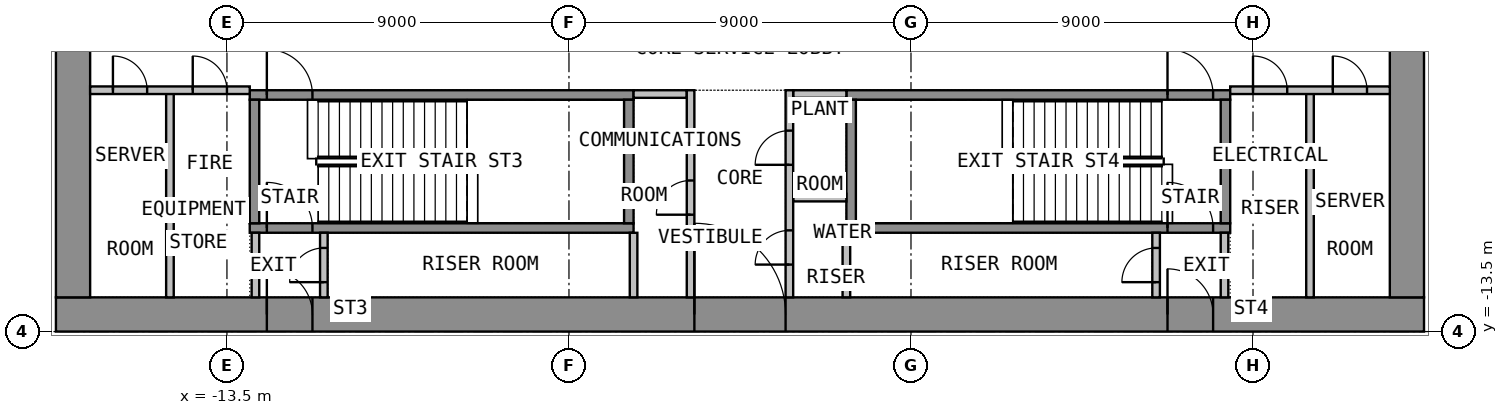
"""IFC4 building model, lengths in metres.
Left out: names, types, materials, properties, quantities, classifications, styles, units other than length and angle.
Written with IfcOpenShell. Run it as: python <this file> out.ifc"""

import sys

from ifc_helpers import new_model, si_unit, direction, frame, frame_2d, origin, place, context, subcontext, project, spatial, rectangle, extrude, element, fill, save


model = new_model("IFC4")
c1 = context("Model", 3, precision=1e-05, world=origin(), true_north=direction((0.0, 1.0)))
c2 = subcontext(c1, "Body", "Model", "MODEL_VIEW")
j1 = project(units=[si_unit("LENGTHUNIT", "METRE"), si_unit("PLANEANGLEUNIT", "RADIAN")], contexts=[c1])
p1 = place(None, origin())
s1 = spatial("IfcSite", under=j1, at=p1, CompositionType="ELEMENT")
p2 = place(p1, origin())
s2 = spatial("IfcBuilding", under=s1, at=p2, CompositionType="ELEMENT")
p3 = place(p2, frame((0.0, 0.0, -5.0)))
s3 = spatial("IfcBuildingStorey", under=s2, at=p3, CompositionType="ELEMENT", Elevation=-5.0)
p4 = place(p3, frame((-18.0, -13.05, 0.0), z_axis=(0.0, 0.0, 1.0), x_axis=(1.0, 0.0, 0.0)))
e1 = element("IfcWall", 1, at=p4, inside=s3, PredefinedType="SHEAR", context=c2, shape_type="SweptSolid", body=[
    extrude(rectangle(XDim=36.0, YDim=0.9, at=frame_2d((18.0, 0.0))), origin(), (0.0, 0.0, 1.0), 4.55),
])
p5 = place(p4, frame((16.8, 0.0, 0.0)))
e2 = element("IfcOpeningElement", 2, at=p5, cuts=e1, PredefinedType="OPENING", context=c2, shape_type="SweptSolid", body=[
    extrude(rectangle(XDim=2.4, YDim=2.1, at=frame_2d((1.2, 1.05))), frame((0.0, 0.46, 0.0), z_axis=(0.0, -1.0, 0.0), x_axis=(1.0, 0.0, 0.0)), (0.0, 0.0, 1.0), 0.92),
])
p6 = place(p4, frame((5.55, 0.0, 0.0)))
e3 = element("IfcOpeningElement", 3, at=p6, cuts=e1, PredefinedType="OPENING", context=c2, shape_type="SweptSolid", body=[
    extrude(rectangle(XDim=1.2, YDim=2.1, at=frame_2d((0.6, 1.05))), frame((0.0, 0.46, 0.0), z_axis=(0.0, -1.0, 0.0), x_axis=(1.0, 0.0, 0.0)), (0.0, 0.0, 1.0), 0.92),
])
p7 = place(p4, frame((29.25, 0.0, 0.0)))
e4 = element("IfcOpeningElement", 4, at=p7, cuts=e1, PredefinedType="OPENING", context=c2, shape_type="SweptSolid", body=[
    extrude(rectangle(XDim=1.2, YDim=2.1, at=frame_2d((0.6, 1.05))), frame((0.0, 0.46, 0.0), z_axis=(0.0, -1.0, 0.0), x_axis=(1.0, 0.0, 0.0)), (0.0, 0.0, 1.0), 0.92),
])
p8 = place(p3, frame((-17.55, -12.6, 0.0), z_axis=(0.0, 0.0, 1.0), x_axis=(0.0, 1.0, 0.0)))
e5 = element("IfcWall", 5, at=p8, inside=s3, PredefinedType="SHEAR", context=c2, shape_type="SweptSolid", body=[
    extrude(rectangle(XDim=25.2, YDim=0.9, at=frame_2d((12.6, 0.0))), origin(), (0.0, 0.0, 1.0), 4.55),
])
p9 = place(p8, frame((11.4, 0.0, 0.0)))
e6 = element("IfcOpeningElement", 6, at=p9, cuts=e5, PredefinedType="OPENING", context=c2, shape_type="SweptSolid", body=[
    extrude(rectangle(XDim=2.4, YDim=2.1, at=frame_2d((1.2, 1.05))), frame((0.0, 0.46, 0.0), z_axis=(0.0, -1.0, 0.0), x_axis=(1.0, 0.0, 0.0)), (0.0, 0.0, 1.0), 0.92),
])
p10 = place(p3, frame((17.55, -12.6, 0.0), z_axis=(0.0, 0.0, 1.0), x_axis=(0.0, 1.0, 0.0)))
e7 = element("IfcWall", 7, at=p10, inside=s3, PredefinedType="SHEAR", context=c2, shape_type="SweptSolid", body=[
    extrude(rectangle(XDim=25.2, YDim=0.9, at=frame_2d((12.6, 0.0))), origin(), (0.0, 0.0, 1.0), 4.55),
])
p11 = place(p10, frame((11.4, 0.0, 0.0)))
e8 = element("IfcOpeningElement", 8, at=p11, cuts=e7, PredefinedType="OPENING", context=c2, shape_type="SweptSolid", body=[
    extrude(rectangle(XDim=2.4, YDim=2.1, at=frame_2d((1.2, 1.05))), frame((0.0, 0.46, 0.0), z_axis=(0.0, -1.0, 0.0), x_axis=(1.0, 0.0, 0.0)), (0.0, 0.0, 1.0), 0.92),
])
p12 = place(p3, frame((-12.9, -10.775, 0.0), z_axis=(0.0, 0.0, 1.0), x_axis=(1.0, 0.0, 0.0)))
e9 = element("IfcWall", 9, at=p12, inside=s3, PredefinedType="SHEAR", context=c2, shape_type="SweptSolid", body=[
    extrude(rectangle(XDim=10.1, YDim=0.25, at=frame_2d((5.05, 0.0))), origin(), (0.0, 0.0, 1.0), 4.55),
])
p13 = place(p12, frame((0.45, 0.0, 0.0)))
e10 = element("IfcOpeningElement", 10, at=p13, cuts=e9, PredefinedType="OPENING", context=c2, shape_type="SweptSolid", body=[
    extrude(rectangle(XDim=1.2, YDim=2.1, at=frame_2d((0.6, 1.05))), frame((0.0, 0.135, 0.0), z_axis=(0.0, -1.0, 0.0), x_axis=(1.0, 0.0, 0.0)), (0.0, 0.0, 1.0), 0.27),
])
p14 = place(p3, frame((-12.9, -7.275, 0.0), z_axis=(0.0, 0.0, 1.0), x_axis=(1.0, 0.0, 0.0)))
e11 = element("IfcWall", 11, at=p14, inside=s3, PredefinedType="SHEAR", context=c2, shape_type="SweptSolid", body=[
    extrude(rectangle(XDim=10.1, YDim=0.25, at=frame_2d((5.05, 0.0))), origin(), (0.0, 0.0, 1.0), 4.55),
])
p15 = place(p14, frame((0.45, 0.0, 0.0)))
e12 = element("IfcOpeningElement", 12, at=p15, cuts=e11, PredefinedType="OPENING", context=c2, shape_type="SweptSolid", body=[
    extrude(rectangle(XDim=1.2, YDim=2.1, at=frame_2d((0.6, 1.05))), frame((0.0, 0.135, 0.0), z_axis=(0.0, -1.0, 0.0), x_axis=(1.0, 0.0, 0.0)), (0.0, 0.0, 1.0), 0.27),
])
for number, where, z_axis, x_axis in (
    (13, (-12.775, -10.65, 0.0), (0.0, 0.0, 1.0), (0.0, 1.0, 0.0)),
    (14, (-2.925, -10.65, 0.0), (0.0, 0.0, 1.0), (0.0, 1.0, 0.0)),
):
    element("IfcWall", number, at=place(p3, frame(where, z_axis=z_axis, x_axis=x_axis)), inside=s3, PredefinedType="SHEAR", context=c2, shape_type="SweptSolid", body=[
        extrude(rectangle(XDim=3.25, YDim=0.25, at=frame_2d((1.625, 0.0))), origin(), (0.0, 0.0, 1.0), 4.55),
    ])
p16 = place(p3, frame((2.8, -10.775, 0.0), z_axis=(0.0, 0.0, 1.0), x_axis=(1.0, 0.0, 0.0)))
e15 = element("IfcWall", 15, at=p16, inside=s3, PredefinedType="SHEAR", context=c2, shape_type="SweptSolid", body=[
    extrude(rectangle(XDim=10.1, YDim=0.25, at=frame_2d((5.05, 0.0))), origin(), (0.0, 0.0, 1.0), 4.55),
])
p17 = place(p16, frame((8.45, 0.0, 0.0)))
e16 = element("IfcOpeningElement", 16, at=p17, cuts=e15, PredefinedType="OPENING", context=c2, shape_type="SweptSolid", body=[
    extrude(rectangle(XDim=1.2, YDim=2.1, at=frame_2d((0.6, 1.05))), frame((0.0, 0.135, 0.0), z_axis=(0.0, -1.0, 0.0), x_axis=(1.0, 0.0, 0.0)), (0.0, 0.0, 1.0), 0.27),
])
p18 = place(p3, frame((2.8, -7.275, 0.0), z_axis=(0.0, 0.0, 1.0), x_axis=(1.0, 0.0, 0.0)))
e17 = element("IfcWall", 17, at=p18, inside=s3, PredefinedType="SHEAR", context=c2, shape_type="SweptSolid", body=[
    extrude(rectangle(XDim=10.1, YDim=0.25, at=frame_2d((5.05, 0.0))), origin(), (0.0, 0.0, 1.0), 4.55),
])
p19 = place(p18, frame((8.45, 0.0, 0.0)))
e18 = element("IfcOpeningElement", 18, at=p19, cuts=e17, PredefinedType="OPENING", context=c2, shape_type="SweptSolid", body=[
    extrude(rectangle(XDim=1.2, YDim=2.1, at=frame_2d((0.6, 1.05))), frame((0.0, 0.135, 0.0), z_axis=(0.0, -1.0, 0.0), x_axis=(1.0, 0.0, 0.0)), (0.0, 0.0, 1.0), 0.27),
])
for number, where, z_axis, x_axis in (
    (19, (2.925, -10.65, 0.0), (0.0, 0.0, 1.0), (0.0, 1.0, 0.0)),
    (20, (12.775, -10.65, 0.0), (0.0, 0.0, 1.0), (0.0, 1.0, 0.0)),
):
    element("IfcWall", number, at=place(p3, frame(where, z_axis=z_axis, x_axis=x_axis)), inside=s3, PredefinedType="SHEAR", context=c2, shape_type="SweptSolid", body=[
        extrude(rectangle(XDim=3.25, YDim=0.25, at=frame_2d((1.625, 0.0))), origin(), (0.0, 0.0, 1.0), 4.55),
    ])
for number, where, z_axis, x_axis in (
    (21, (-2.8, -7.25, 0.0), (0.0, 0.0, 1.0), (1.0, 0.0, 0.0)),
    (22, (1.4, -7.25, 0.0), (0.0, 0.0, 1.0), (1.0, 0.0, 0.0)),
    (23, (1.4, -9.975, 0.0), (0.0, 0.0, 1.0), (1.0, 0.0, 0.0)),
):
    element("IfcWall", number, at=place(p3, frame(where, z_axis=z_axis, x_axis=x_axis)), inside=s3, PredefinedType="PARTITIONING", context=c2, shape_type="SweptSolid", body=[
        extrude(rectangle(XDim=1.4, YDim=0.2, at=frame_2d((0.7, 0.0))), origin(), (0.0, 0.0, 1.0), 4.55),
    ])
p20 = place(p3, frame((-1.3, -12.6, 0.0), z_axis=(0.0, 0.0, 1.0), x_axis=(0.0, 1.0, 0.0)))
e24 = element("IfcWall", 24, at=p20, inside=s3, PredefinedType="PARTITIONING", context=c2, shape_type="SweptSolid", body=[
    extrude(rectangle(XDim=5.45, YDim=0.2, at=frame_2d((2.725, 0.0))), origin(), (0.0, 0.0, 1.0), 4.55),
])
p21 = place(p20, frame((2.175, 0.0, 0.0)))
e25 = element("IfcOpeningElement", 25, at=p21, cuts=e24, PredefinedType="OPENING", context=c2, shape_type="SweptSolid", body=[
    extrude(rectangle(XDim=0.9, YDim=2.1, at=frame_2d((0.45, 1.05))), frame((0.0, 0.11, 0.0), z_axis=(0.0, -1.0, 0.0), x_axis=(1.0, 0.0, 0.0)), (0.0, 0.0, 1.0), 0.22),
])
p22 = place(p3, frame((1.3, -12.6, 0.0), z_axis=(0.0, 0.0, 1.0), x_axis=(0.0, 1.0, 0.0)))
e26 = element("IfcWall", 26, at=p22, inside=s3, PredefinedType="PARTITIONING", context=c2, shape_type="SweptSolid", body=[
    extrude(rectangle(XDim=5.45, YDim=0.2, at=frame_2d((2.725, 0.0))), origin(), (0.0, 0.0, 1.0), 4.55),
])
p23 = place(p22, frame((0.863, 0.0, 0.0)))
e27 = element("IfcOpeningElement", 27, at=p23, cuts=e26, PredefinedType="OPENING", context=c2, shape_type="SweptSolid", body=[
    extrude(rectangle(XDim=0.9, YDim=2.1, at=frame_2d((0.45, 1.05))), frame((0.0, 0.11, 0.0), z_axis=(0.0, -1.0, 0.0), x_axis=(1.0, 0.0, 0.0)), (0.0, 0.0, 1.0), 0.22),
])
p24 = place(p22, frame((3.488, 0.0, 0.0)))
e28 = element("IfcOpeningElement", 28, at=p24, cuts=e26, PredefinedType="OPENING", context=c2, shape_type="SweptSolid", body=[
    extrude(rectangle(XDim=0.9, YDim=2.1, at=frame_2d((0.45, 1.05))), frame((0.0, 0.11, 0.0), z_axis=(0.0, -1.0, 0.0), x_axis=(1.0, 0.0, 0.0)), (0.0, 0.0, 1.0), 0.22),
])
p25 = place(p3, frame((-12.75, -12.6, 0.0), z_axis=(0.0, 0.0, 1.0), x_axis=(0.0, 1.0, 0.0)))
e29 = element("IfcWall", 29, at=p25, inside=s3, PredefinedType="PARTITIONING", context=c2, shape_type="SweptSolid", body=[
    extrude(rectangle(XDim=1.7, YDim=0.2, at=frame_2d((0.85, 0.0))), origin(), (0.0, 0.0, 1.0), 4.55),
])
p26 = place(p3, frame((-10.95, -12.6, 0.0), z_axis=(0.0, 0.0, 1.0), x_axis=(0.0, 1.0, 0.0)))
e30 = element("IfcWall", 30, at=p26, inside=s3, PredefinedType="PARTITIONING", context=c2, shape_type="SweptSolid", body=[
    extrude(rectangle(XDim=1.7, YDim=0.2, at=frame_2d((0.85, 0.0))), origin(), (0.0, 0.0, 1.0), 4.55),
])
p27 = place(p26, frame((0.4, 0.0, 0.0)))
e31 = element("IfcOpeningElement", 31, at=p27, cuts=e30, PredefinedType="OPENING", context=c2, shape_type="SweptSolid", body=[
    extrude(rectangle(XDim=0.9, YDim=2.1, at=frame_2d((0.45, 1.05))), frame((0.0, 0.11, 0.0), z_axis=(0.0, -1.0, 0.0), x_axis=(1.0, 0.0, 0.0)), (0.0, 0.0, 1.0), 0.22),
])
p28 = place(p3, frame((12.75, -12.6, 0.0), z_axis=(0.0, 0.0, 1.0), x_axis=(0.0, 1.0, 0.0)))
e32 = element("IfcWall", 32, at=p28, inside=s3, PredefinedType="PARTITIONING", context=c2, shape_type="SweptSolid", body=[
    extrude(rectangle(XDim=1.7, YDim=0.2, at=frame_2d((0.85, 0.0))), origin(), (0.0, 0.0, 1.0), 4.55),
])
p29 = place(p3, frame((10.95, -12.6, 0.0), z_axis=(0.0, 0.0, 1.0), x_axis=(0.0, 1.0, 0.0)))
e33 = element("IfcWall", 33, at=p29, inside=s3, PredefinedType="PARTITIONING", context=c2, shape_type="SweptSolid", body=[
    extrude(rectangle(XDim=1.7, YDim=0.2, at=frame_2d((0.85, 0.0))), origin(), (0.0, 0.0, 1.0), 4.55),
])
p30 = place(p29, frame((0.4, 0.0, 0.0)))
e34 = element("IfcOpeningElement", 34, at=p30, cuts=e33, PredefinedType="OPENING", context=c2, shape_type="SweptSolid", body=[
    extrude(rectangle(XDim=0.9, YDim=2.1, at=frame_2d((0.45, 1.05))), frame((0.0, 0.11, 0.0), z_axis=(0.0, -1.0, 0.0), x_axis=(1.0, 0.0, 0.0)), (0.0, 0.0, 1.0), 0.22),
])
p31 = place(p3, frame((-15.0, -12.6, 0.0), z_axis=(0.0, 0.0, 1.0), x_axis=(0.0, 1.0, 0.0)))
e35 = element("IfcWall", 35, at=p31, inside=s3, PredefinedType="PARTITIONING", context=c2, shape_type="SweptSolid", body=[
    extrude(rectangle(XDim=5.45, YDim=0.2, at=frame_2d((2.725, 0.0))), origin(), (0.0, 0.0, 1.0), 4.55),
])
p32 = place(p3, frame((-17.1, -7.15, 0.0), z_axis=(0.0, 0.0, 1.0), x_axis=(1.0, 0.0, 0.0)))
e36 = element("IfcWall", 36, at=p32, inside=s3, PredefinedType="PARTITIONING", context=c2, shape_type="SweptSolid", body=[
    extrude(rectangle(XDim=4.2, YDim=0.2, at=frame_2d((2.1, 0.0))), origin(), (0.0, 0.0, 1.0), 4.55),
])
p33 = place(p32, frame((0.6, 0.0, 0.0)))
e37 = element("IfcOpeningElement", 37, at=p33, cuts=e36, PredefinedType="OPENING", context=c2, shape_type="SweptSolid", body=[
    extrude(rectangle(XDim=0.9, YDim=2.1, at=frame_2d((0.45, 1.05))), frame((0.0, 0.11, 0.0), z_axis=(0.0, -1.0, 0.0), x_axis=(1.0, 0.0, 0.0)), (0.0, 0.0, 1.0), 0.22),
])
p34 = place(p32, frame((2.7, 0.0, 0.0)))
e38 = element("IfcOpeningElement", 38, at=p34, cuts=e36, PredefinedType="OPENING", context=c2, shape_type="SweptSolid", body=[
    extrude(rectangle(XDim=0.9, YDim=2.1, at=frame_2d((0.45, 1.05))), frame((0.0, 0.11, 0.0), z_axis=(0.0, -1.0, 0.0), x_axis=(1.0, 0.0, 0.0)), (0.0, 0.0, 1.0), 0.22),
])
p35 = place(p3, frame((15.0, -12.6, 0.0), z_axis=(0.0, 0.0, 1.0), x_axis=(0.0, 1.0, 0.0)))
e39 = element("IfcWall", 39, at=p35, inside=s3, PredefinedType="PARTITIONING", context=c2, shape_type="SweptSolid", body=[
    extrude(rectangle(XDim=5.45, YDim=0.2, at=frame_2d((2.725, 0.0))), origin(), (0.0, 0.0, 1.0), 4.55),
])
p36 = place(p3, frame((12.9, -7.15, 0.0), z_axis=(0.0, 0.0, 1.0), x_axis=(1.0, 0.0, 0.0)))
e40 = element("IfcWall", 40, at=p36, inside=s3, PredefinedType="PARTITIONING", context=c2, shape_type="SweptSolid", body=[
    extrude(rectangle(XDim=4.2, YDim=0.2, at=frame_2d((2.1, 0.0))), origin(), (0.0, 0.0, 1.0), 4.55),
])
p37 = place(p36, frame((0.6, 0.0, 0.0)))
e41 = element("IfcOpeningElement", 41, at=p37, cuts=e40, PredefinedType="OPENING", context=c2, shape_type="SweptSolid", body=[
    extrude(rectangle(XDim=0.9, YDim=2.1, at=frame_2d((0.45, 1.05))), frame((0.0, 0.11, 0.0), z_axis=(0.0, -1.0, 0.0), x_axis=(1.0, 0.0, 0.0)), (0.0, 0.0, 1.0), 0.22),
])
p38 = place(p36, frame((2.7, 0.0, 0.0)))
e42 = element("IfcOpeningElement", 42, at=p38, cuts=e40, PredefinedType="OPENING", context=c2, shape_type="SweptSolid", body=[
    extrude(rectangle(XDim=0.9, YDim=2.1, at=frame_2d((0.45, 1.05))), frame((0.0, 0.11, 0.0), z_axis=(0.0, -1.0, 0.0), x_axis=(1.0, 0.0, 0.0)), (0.0, 0.0, 1.0), 0.22),
])
for number, where, z_axis, x_axis in (
    (43, (-2.8, -12.599, 0.0), (0.0, 0.0, 1.0), (0.0, 1.0, 0.0)),
    (44, (2.8, -12.599, 0.0), (0.0, 0.0, 1.0), (0.0, 1.0, 0.0)),
):
    element("IfcWall", number, at=place(p3, frame(where, z_axis=z_axis, x_axis=x_axis)), inside=s3, PredefinedType="PARTITIONING", context=c2, shape_type="SweptSolid", body=[
        extrude(rectangle(XDim=1.698, YDim=0.2, at=frame_2d((0.849, 0.0))), origin(), (0.0, 0.0, 1.0), 4.55),
    ])
p39 = place(p5, origin())
e45 = element("IfcDoor", 45, at=p39, inside=s3, OperationType="DOUBLE_DOOR_DOUBLE_SWING", PredefinedType="DOOR", context=c2, shape_type="SweptSolid", body=[
    extrude(rectangle(XDim=2.4, YDim=2.1, at=frame_2d((1.2, 1.05))), frame((0.0, 0.025, 0.0), z_axis=(0.0, -1.0, 0.0), x_axis=(1.0, 0.0, 0.0)), (0.0, 0.0, 1.0), 0.05),
])
fill(e2, e45)
p40 = place(p6, origin())
e46 = element("IfcDoor", 46, at=p40, inside=s3, OperationType="SINGLE_SWING_RIGHT", PredefinedType="DOOR", context=c2, shape_type="SweptSolid", body=[
    extrude(rectangle(XDim=1.2, YDim=2.1, at=frame_2d((0.6, 1.05))), frame((0.0, 0.025, 0.0), z_axis=(0.0, -1.0, 0.0), x_axis=(1.0, 0.0, 0.0)), (0.0, 0.0, 1.0), 0.05),
])
fill(e3, e46)
p41 = place(p7, origin())
e47 = element("IfcDoor", 47, at=p41, inside=s3, OperationType="SINGLE_SWING_RIGHT", PredefinedType="DOOR", context=c2, shape_type="SweptSolid", body=[
    extrude(rectangle(XDim=1.2, YDim=2.1, at=frame_2d((0.6, 1.05))), frame((0.0, 0.025, 0.0), z_axis=(0.0, -1.0, 0.0), x_axis=(1.0, 0.0, 0.0)), (0.0, 0.0, 1.0), 0.05),
])
fill(e4, e47)
p42 = place(p15, origin())
e48 = element("IfcDoor", 48, at=p42, inside=s3, OperationType="SINGLE_SWING_LEFT", PredefinedType="DOOR", context=c2, shape_type="SweptSolid", body=[
    extrude(rectangle(XDim=1.2, YDim=2.1, at=frame_2d((0.6, 1.05))), frame((0.0, 0.025, 0.0), z_axis=(0.0, -1.0, 0.0), x_axis=(1.0, 0.0, 0.0)), (0.0, 0.0, 1.0), 0.05),
])
fill(e12, e48)
p43 = place(p19, origin())
e49 = element("IfcDoor", 49, at=p43, inside=s3, OperationType="SINGLE_SWING_LEFT", PredefinedType="DOOR", context=c2, shape_type="SweptSolid", body=[
    extrude(rectangle(XDim=1.2, YDim=2.1, at=frame_2d((0.6, 1.05))), frame((0.0, 0.025, 0.0), z_axis=(0.0, -1.0, 0.0), x_axis=(1.0, 0.0, 0.0)), (0.0, 0.0, 1.0), 0.05),
])
fill(e18, e49)
p44 = place(p21, origin())
e50 = element("IfcDoor", 50, at=p44, inside=s3, OperationType="SINGLE_SWING_LEFT", PredefinedType="DOOR", context=c2, shape_type="SweptSolid", body=[
    extrude(rectangle(XDim=0.9, YDim=2.1, at=frame_2d((0.45, 1.05))), frame((0.0, 0.025, 0.0), z_axis=(0.0, -1.0, 0.0), x_axis=(1.0, 0.0, 0.0)), (0.0, 0.0, 1.0), 0.05),
])
fill(e25, e50)
p45 = place(p23, origin())
e51 = element("IfcDoor", 51, at=p45, inside=s3, OperationType="SINGLE_SWING_LEFT", PredefinedType="DOOR", context=c2, shape_type="SweptSolid", body=[
    extrude(rectangle(XDim=0.9, YDim=2.1, at=frame_2d((0.45, 1.05))), frame((0.0, 0.025, 0.0), z_axis=(0.0, -1.0, 0.0), x_axis=(1.0, 0.0, 0.0)), (0.0, 0.0, 1.0), 0.05),
])
fill(e27, e51)
p46 = place(p24, origin())
e52 = element("IfcDoor", 52, at=p46, inside=s3, OperationType="SINGLE_SWING_LEFT", PredefinedType="DOOR", context=c2, shape_type="SweptSolid", body=[
    extrude(rectangle(XDim=0.9, YDim=2.1, at=frame_2d((0.45, 1.05))), frame((0.0, 0.025, 0.0), z_axis=(0.0, -1.0, 0.0), x_axis=(1.0, 0.0, 0.0)), (0.0, 0.0, 1.0), 0.05),
])
fill(e28, e52)
p47 = place(p13, origin())
e53 = element("IfcDoor", 53, at=p47, inside=s3, OperationType="SINGLE_SWING_RIGHT", PredefinedType="DOOR", context=c2, shape_type="SweptSolid", body=[
    extrude(rectangle(XDim=1.2, YDim=2.1, at=frame_2d((0.6, 1.05))), frame((0.0, 0.025, 0.0), z_axis=(0.0, -1.0, 0.0), x_axis=(1.0, 0.0, 0.0)), (0.0, 0.0, 1.0), 0.05),
])
fill(e10, e53)
p48 = place(p27, origin())
e54 = element("IfcDoor", 54, at=p48, inside=s3, OperationType="SINGLE_SWING_LEFT", PredefinedType="DOOR", context=c2, shape_type="SweptSolid", body=[
    extrude(rectangle(XDim=0.9, YDim=2.1, at=frame_2d((0.45, 1.05))), frame((0.0, 0.025, 0.0), z_axis=(0.0, -1.0, 0.0), x_axis=(1.0, 0.0, 0.0)), (0.0, 0.0, 1.0), 0.05),
])
fill(e31, e54)
p49 = place(p17, origin())
e55 = element("IfcDoor", 55, at=p49, inside=s3, OperationType="SINGLE_SWING_RIGHT", PredefinedType="DOOR", context=c2, shape_type="SweptSolid", body=[
    extrude(rectangle(XDim=1.2, YDim=2.1, at=frame_2d((0.6, 1.05))), frame((0.0, 0.025, 0.0), z_axis=(0.0, -1.0, 0.0), x_axis=(1.0, 0.0, 0.0)), (0.0, 0.0, 1.0), 0.05),
])
fill(e16, e55)
p50 = place(p30, origin())
e56 = element("IfcDoor", 56, at=p50, inside=s3, OperationType="SINGLE_SWING_LEFT", PredefinedType="DOOR", context=c2, shape_type="SweptSolid", body=[
    extrude(rectangle(XDim=0.9, YDim=2.1, at=frame_2d((0.45, 1.05))), frame((0.0, 0.025, 0.0), z_axis=(0.0, -1.0, 0.0), x_axis=(1.0, 0.0, 0.0)), (0.0, 0.0, 1.0), 0.05),
])
fill(e34, e56)
p51 = place(p33, origin())
e57 = element("IfcDoor", 57, at=p51, inside=s3, OperationType="SINGLE_SWING_LEFT", PredefinedType="DOOR", context=c2, shape_type="SweptSolid", body=[
    extrude(rectangle(XDim=0.9, YDim=2.1, at=frame_2d((0.45, 1.05))), frame((0.0, 0.025, 0.0), z_axis=(0.0, -1.0, 0.0), x_axis=(1.0, 0.0, 0.0)), (0.0, 0.0, 1.0), 0.05),
])
fill(e37, e57)
p52 = place(p34, origin())
e58 = element("IfcDoor", 58, at=p52, inside=s3, OperationType="SINGLE_SWING_LEFT", PredefinedType="DOOR", context=c2, shape_type="SweptSolid", body=[
    extrude(rectangle(XDim=0.9, YDim=2.1, at=frame_2d((0.45, 1.05))), frame((0.0, 0.025, 0.0), z_axis=(0.0, -1.0, 0.0), x_axis=(1.0, 0.0, 0.0)), (0.0, 0.0, 1.0), 0.05),
])
fill(e38, e58)
p53 = place(p37, origin())
e59 = element("IfcDoor", 59, at=p53, inside=s3, OperationType="SINGLE_SWING_LEFT", PredefinedType="DOOR", context=c2, shape_type="SweptSolid", body=[
    extrude(rectangle(XDim=0.9, YDim=2.1, at=frame_2d((0.45, 1.05))), frame((0.0, 0.025, 0.0), z_axis=(0.0, -1.0, 0.0), x_axis=(1.0, 0.0, 0.0)), (0.0, 0.0, 1.0), 0.05),
])
fill(e41, e59)
p54 = place(p38, origin())
e60 = element("IfcDoor", 60, at=p54, inside=s3, OperationType="SINGLE_SWING_LEFT", PredefinedType="DOOR", context=c2, shape_type="SweptSolid", body=[
    extrude(rectangle(XDim=0.9, YDim=2.1, at=frame_2d((0.45, 1.05))), frame((0.0, 0.025, 0.0), z_axis=(0.0, -1.0, 0.0), x_axis=(1.0, 0.0, 0.0)), (0.0, 0.0, 1.0), 0.05),
])
fill(e42, e60)
save(model, sys.argv[1])
